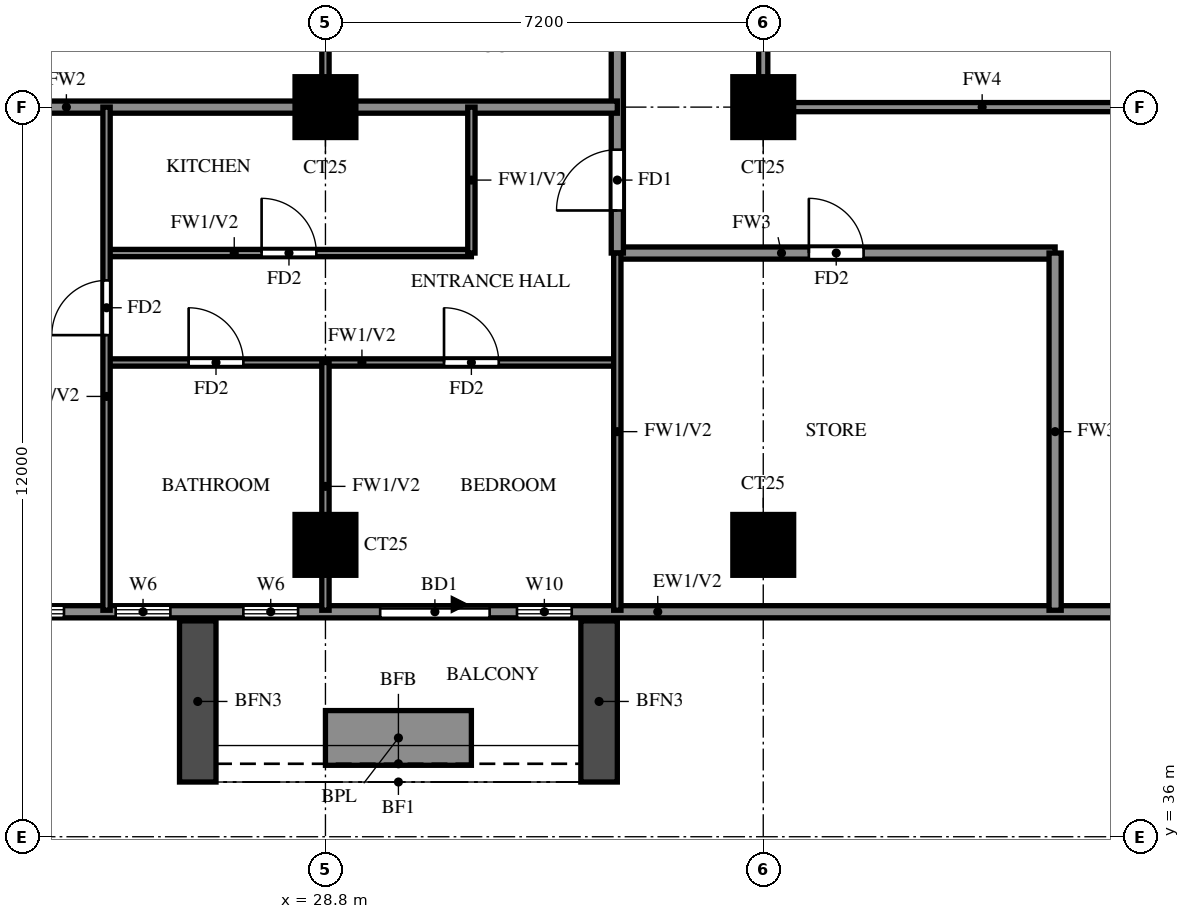
"""IFC4 building model, lengths in metres.
Left out: names, types, materials, properties, quantities, classifications, styles, units other than length and angle.
Written with IfcOpenShell. Run it as: python <this file> out.ifc"""

import sys

from ifc_helpers import new_model, si_unit, direction, frame, frame_2d, origin, origin_2d, place, context, subcontext, project, spatial, rectangle, extrude, source, transform, mapped, element, fill, save


model = new_model("IFC4")
c1 = context("Model", 3, precision=1e-05, world=origin(), true_north=direction((0.0, 1.0)))
c2 = subcontext(c1, "Body", "Model", "MODEL_VIEW")
j1 = project(units=[si_unit("LENGTHUNIT", "METRE"), si_unit("PLANEANGLEUNIT", "RADIAN")], contexts=[c1])
p1 = place(None, origin())
s1 = spatial("IfcSite", under=j1, at=p1, CompositionType="ELEMENT")
p2 = place(p1, origin())
s2 = spatial("IfcBuilding", under=s1, at=p2, CompositionType="ELEMENT")
p3 = place(p2, frame((0.0, 0.0, 146.5)))
s3 = spatial("IfcBuildingStorey", under=s2, at=p3, CompositionType="ELEMENT", Elevation=146.5)
m1 = source(origin(), c2, "Body", "SweptSolid", [
    extrude(rectangle(XDim=1.0, YDim=1.0, at=origin_2d()), origin(), (0.0, 0.0, 1.0), 3.2),
])
for number, where, z_axis, x_axis in (
    (1, (28.8, 40.8, 0.0), (0.0, 0.0, 1.0), (1.0, 0.0, 0.0)),
    (2, (36.0, 40.8, 0.0), (0.0, 0.0, 1.0), (1.0, 0.0, 0.0)),
    (3, (28.8, 48.0, 0.0), (0.0, 0.0, 1.0), (1.0, 0.0, 0.0)),
    (4, (36.0, 48.0, 0.0), (0.0, 0.0, 1.0), (1.0, 0.0, 0.0)),
):
    element("IfcColumn", number, at=place(p3, frame(where, z_axis=z_axis, x_axis=x_axis)), inside=s3, PredefinedType="COLUMN", context=c2, shape_type="MappedRepresentation", body=[
        mapped(m1, transform((0.0, 0.0, 0.0))),
    ])
p4 = place(p3, frame((18.2, 39.7, 0.0), z_axis=(0.0, 0.0, 1.0), x_axis=(1.0, 0.0, 0.0)))
e5 = element("IfcWall", 5, at=p4, inside=s3, PredefinedType="SOLIDWALL", context=c2, shape_type="SweptSolid", body=[
    extrude(rectangle(XDim=23.8, YDim=0.2, at=frame_2d((11.9, 0.0))), origin(), (0.0, 0.0, 1.0), 3.2),
])
p5 = place(p4, frame((11.5, 0.0, 0.0)))
e6 = element("IfcOpeningElement", 6, at=p5, cuts=e5, PredefinedType="OPENING", context=c2, shape_type="SweptSolid", body=[
    extrude(rectangle(XDim=1.8, YDim=2.4, at=frame_2d((0.9, 1.2))), frame((0.0, 0.11, 0.0), z_axis=(0.0, -1.0, 0.0), x_axis=(1.0, 0.0, 0.0)), (0.0, 0.0, 1.0), 0.22),
])
p6 = place(p4, frame((0.9, 0.0, 0.6)))
e7 = element("IfcOpeningElement", 7, at=p6, cuts=e5, PredefinedType="OPENING", context=c2, shape_type="SweptSolid", body=[
    extrude(rectangle(XDim=2.4, YDim=2.4, at=frame_2d((1.2, 1.2))), frame((0.0, 0.11, 0.0), z_axis=(0.0, -1.0, 0.0), x_axis=(1.0, 0.0, 0.0)), (0.0, 0.0, 1.0), 0.22),
])
p7 = place(p4, frame((3.9, 0.0, 0.6)))
e8 = element("IfcOpeningElement", 8, at=p7, cuts=e5, PredefinedType="OPENING", context=c2, shape_type="SweptSolid", body=[
    extrude(rectangle(XDim=2.4, YDim=2.4, at=frame_2d((1.2, 1.2))), frame((0.0, 0.11, 0.0), z_axis=(0.0, -1.0, 0.0), x_axis=(1.0, 0.0, 0.0)), (0.0, 0.0, 1.0), 0.22),
])
p8 = place(p4, frame((7.15, 0.0, 1.5)))
e9 = element("IfcOpeningElement", 9, at=p8, cuts=e5, PredefinedType="OPENING", context=c2, shape_type="SweptSolid", body=[
    extrude(rectangle(XDim=0.9, YDim=0.9, at=frame_2d((0.45, 0.45))), frame((0.0, 0.11, 0.0), z_axis=(0.0, -1.0, 0.0), x_axis=(1.0, 0.0, 0.0)), (0.0, 0.0, 1.0), 0.22),
])
p9 = place(p4, frame((9.25, 0.0, 1.5)))
e10 = element("IfcOpeningElement", 10, at=p9, cuts=e5, PredefinedType="OPENING", context=c2, shape_type="SweptSolid", body=[
    extrude(rectangle(XDim=0.9, YDim=0.9, at=frame_2d((0.45, 0.45))), frame((0.0, 0.11, 0.0), z_axis=(0.0, -1.0, 0.0), x_axis=(1.0, 0.0, 0.0)), (0.0, 0.0, 1.0), 0.22),
])
p10 = place(p4, frame((13.75, 0.0, 0.6)))
e11 = element("IfcOpeningElement", 11, at=p10, cuts=e5, PredefinedType="OPENING", context=c2, shape_type="SweptSolid", body=[
    extrude(rectangle(XDim=0.9, YDim=2.4, at=frame_2d((0.45, 1.2))), frame((0.0, 0.11, 0.0), z_axis=(0.0, -1.0, 0.0), x_axis=(1.0, 0.0, 0.0)), (0.0, 0.0, 1.0), 0.22),
])
for number, where, z_axis, x_axis in (
    (12, (26.7, 39.55, 0.0), (0.0, 0.0, 1.0), (0.0, -1.0, 0.0)),
    (13, (33.3, 39.55, 0.0), (0.0, 0.0, 1.0), (0.0, -1.0, 0.0)),
):
    element("IfcWall", number, at=place(p3, frame(where, z_axis=z_axis, x_axis=x_axis)), inside=s3, PredefinedType="SOLIDWALL", context=c2, shape_type="SweptSolid", body=[
        extrude(rectangle(XDim=2.65, YDim=0.6, at=frame_2d((1.325, 0.0))), origin(), (0.0, 0.0, 1.0), 2.85),
    ])
p11 = place(p3, frame((28.8, 37.625, 0.0), z_axis=(0.0, 0.0, 1.0), x_axis=(1.0, 0.0, 0.0)))
e14 = element("IfcWall", 14, at=p11, inside=s3, PredefinedType="SOLIDWALL", context=c2, shape_type="SweptSolid", body=[
    extrude(rectangle(XDim=2.4, YDim=0.9, at=frame_2d((1.2, 0.0))), origin(), (0.0, 0.0, 1.0), 0.9),
])
p12 = place(p3, frame((33.6, 45.6, 0.0), z_axis=(0.0, 0.0, 1.0), x_axis=(1.0, 0.0, 0.0)))
e15 = element("IfcWall", 15, at=p12, inside=s3, PredefinedType="SOLIDWALL", context=c2, shape_type="SweptSolid", body=[
    extrude(rectangle(XDim=7.2, YDim=0.2, at=frame_2d((3.6, 0.0))), origin(), (0.0, 0.0, 1.0), 3.2),
])
p13 = place(p12, frame((3.15, 0.0, 0.0)))
e16 = element("IfcOpeningElement", 16, at=p13, cuts=e15, PredefinedType="OPENING", context=c2, shape_type="SweptSolid", body=[
    extrude(rectangle(XDim=0.9, YDim=2.1, at=frame_2d((0.45, 1.05))), frame((0.0, 0.11, 0.0), z_axis=(0.0, -1.0, 0.0), x_axis=(1.0, 0.0, 0.0)), (0.0, 0.0, 1.0), 0.22),
])
p14 = place(p3, frame((33.6, 45.6, 0.0), z_axis=(0.0, 0.0, 1.0), x_axis=(0.0, 1.0, 0.0)))
e17 = element("IfcWall", 17, at=p14, inside=s3, PredefinedType="SOLIDWALL", context=c2, shape_type="SweptSolid", body=[
    extrude(rectangle(XDim=16.8, YDim=0.2, at=frame_2d((8.4, 0.0))), origin(), (0.0, 0.0, 1.0), 3.2),
])
p15 = place(p14, frame((0.7, 0.0, 0.0)))
e18 = element("IfcOpeningElement", 18, at=p15, cuts=e17, PredefinedType="OPENING", context=c2, shape_type="SweptSolid", body=[
    extrude(rectangle(XDim=1.0, YDim=2.1, at=frame_2d((0.5, 1.05))), frame((0.0, 0.11, 0.0), z_axis=(0.0, -1.0, 0.0), x_axis=(1.0, 0.0, 0.0)), (0.0, 0.0, 1.0), 0.22),
])
p16 = place(p14, frame((6.7, 0.0, 0.0)))
e19 = element("IfcOpeningElement", 19, at=p16, cuts=e17, PredefinedType="OPENING", context=c2, shape_type="SweptSolid", body=[
    extrude(rectangle(XDim=1.0, YDim=2.1, at=frame_2d((0.5, 1.05))), frame((0.0, 0.11, 0.0), z_axis=(0.0, -1.0, 0.0), x_axis=(1.0, 0.0, 0.0)), (0.0, 0.0, 1.0), 0.22),
])
p17 = place(p14, frame((15.1, 0.0, 0.0)))
e20 = element("IfcOpeningElement", 20, at=p17, cuts=e17, PredefinedType="OPENING", context=c2, shape_type="SweptSolid", body=[
    extrude(rectangle(XDim=1.0, YDim=2.1, at=frame_2d((0.5, 1.05))), frame((0.0, 0.11, 0.0), z_axis=(0.0, -1.0, 0.0), x_axis=(1.0, 0.0, 0.0)), (0.0, 0.0, 1.0), 0.22),
])
p18 = place(p3, frame((40.8, 39.725, 0.0), z_axis=(0.0, 0.0, 1.0), x_axis=(0.0, 1.0, 0.0)))
e21 = element("IfcWall", 21, at=p18, inside=s3, PredefinedType="SOLIDWALL", context=c2, shape_type="SweptSolid", body=[
    extrude(rectangle(XDim=5.875, YDim=0.2, at=frame_2d((2.938, 0.0))), origin(), (0.0, 0.0, 1.0), 3.2),
])
p19 = place(p3, frame((14.525, 48.0, 0.0), z_axis=(0.0, 0.0, 1.0), x_axis=(1.0, 0.0, 0.0)))
e22 = element("IfcWall", 22, at=p19, inside=s3, PredefinedType="SOLIDWALL", context=c2, shape_type="SweptSolid", body=[
    extrude(rectangle(XDim=19.075, YDim=0.2, at=frame_2d((9.538, 0.0))), origin(), (0.0, 0.0, 1.0), 3.2),
])
p20 = place(p3, frame((25.2, 43.8, 0.0), z_axis=(0.0, 0.0, 1.0), x_axis=(1.0, 0.0, 0.0)))
e23 = element("IfcWall", 23, at=p20, inside=s3, PredefinedType="PARTITIONING", context=c2, shape_type="SweptSolid", body=[
    extrude(rectangle(XDim=8.4, YDim=0.12, at=frame_2d((4.2, 0.0))), origin(), (0.0, 0.0, 1.0), 3.2),
])
p21 = place(p20, frame((1.35, 0.0, 0.0)))
e24 = element("IfcOpeningElement", 24, at=p21, cuts=e23, PredefinedType="OPENING", context=c2, shape_type="SweptSolid", body=[
    extrude(rectangle(XDim=0.9, YDim=2.1, at=frame_2d((0.45, 1.05))), frame((0.0, 0.07, 0.0), z_axis=(0.0, -1.0, 0.0), x_axis=(1.0, 0.0, 0.0)), (0.0, 0.0, 1.0), 0.14),
])
p22 = place(p20, frame((5.55, 0.0, 0.0)))
e25 = element("IfcOpeningElement", 25, at=p22, cuts=e23, PredefinedType="OPENING", context=c2, shape_type="SweptSolid", body=[
    extrude(rectangle(XDim=0.9, YDim=2.1, at=frame_2d((0.45, 1.05))), frame((0.0, 0.07, 0.0), z_axis=(0.0, -1.0, 0.0), x_axis=(1.0, 0.0, 0.0)), (0.0, 0.0, 1.0), 0.14),
])
p23 = place(p3, frame((25.2, 45.6, 0.0), z_axis=(0.0, 0.0, 1.0), x_axis=(1.0, 0.0, 0.0)))
e26 = element("IfcWall", 26, at=p23, inside=s3, PredefinedType="PARTITIONING", context=c2, shape_type="SweptSolid", body=[
    extrude(rectangle(XDim=6.0, YDim=0.12, at=frame_2d((3.0, 0.0))), origin(), (0.0, 0.0, 1.0), 3.2),
])
p24 = place(p23, frame((2.55, 0.0, 0.0)))
e27 = element("IfcOpeningElement", 27, at=p24, cuts=e26, PredefinedType="OPENING", context=c2, shape_type="SweptSolid", body=[
    extrude(rectangle(XDim=0.9, YDim=2.1, at=frame_2d((0.45, 1.05))), frame((0.0, 0.07, 0.0), z_axis=(0.0, -1.0, 0.0), x_axis=(1.0, 0.0, 0.0)), (0.0, 0.0, 1.0), 0.14),
])
p25 = place(p3, frame((25.2, 39.725, 0.0), z_axis=(0.0, 0.0, 1.0), x_axis=(0.0, 1.0, 0.0)))
e28 = element("IfcWall", 28, at=p25, inside=s3, PredefinedType="PARTITIONING", context=c2, shape_type="SweptSolid", body=[
    extrude(rectangle(XDim=8.275, YDim=0.12, at=frame_2d((4.137, 0.0))), origin(), (0.0, 0.0, 1.0), 3.2),
])
p26 = place(p25, frame((4.525, 0.0, 0.0)))
e29 = element("IfcOpeningElement", 29, at=p26, cuts=e28, PredefinedType="OPENING", context=c2, shape_type="SweptSolid", body=[
    extrude(rectangle(XDim=0.9, YDim=2.1, at=frame_2d((0.45, 1.05))), frame((0.0, 0.07, 0.0), z_axis=(0.0, -1.0, 0.0), x_axis=(1.0, 0.0, 0.0)), (0.0, 0.0, 1.0), 0.14),
])
p27 = place(p3, frame((28.8, 39.725, 0.0), z_axis=(0.0, 0.0, 1.0), x_axis=(0.0, 1.0, 0.0)))
e30 = element("IfcWall", 30, at=p27, inside=s3, PredefinedType="PARTITIONING", context=c2, shape_type="SweptSolid", body=[
    extrude(rectangle(XDim=4.075, YDim=0.12, at=frame_2d((2.038, 0.0))), origin(), (0.0, 0.0, 1.0), 3.2),
])
p28 = place(p3, frame((28.8, 48.0, 0.0), z_axis=(0.0, 0.0, 1.0), x_axis=(0.0, 1.0, 0.0)))
e31 = element("IfcWall", 31, at=p28, inside=s3, PredefinedType="PARTITIONING", context=c2, shape_type="SweptSolid", body=[
    extrude(rectangle(XDim=3.6, YDim=0.12, at=frame_2d((1.8, 0.0))), origin(), (0.0, 0.0, 1.0), 3.2),
])
p29 = place(p3, frame((31.2, 45.6, 0.0), z_axis=(0.0, 0.0, 1.0), x_axis=(0.0, 1.0, 0.0)))
e32 = element("IfcWall", 32, at=p29, inside=s3, PredefinedType="PARTITIONING", context=c2, shape_type="SweptSolid", body=[
    extrude(rectangle(XDim=2.4, YDim=0.12, at=frame_2d((1.2, 0.0))), origin(), (0.0, 0.0, 1.0), 3.2),
])
p30 = place(p3, frame((33.6, 39.725, 0.0), z_axis=(0.0, 0.0, 1.0), x_axis=(0.0, 1.0, 0.0)))
e33 = element("IfcWall", 33, at=p30, inside=s3, PredefinedType="PARTITIONING", context=c2, shape_type="SweptSolid", body=[
    extrude(rectangle(XDim=5.875, YDim=0.12, at=frame_2d((2.938, 0.0))), origin(), (0.0, 0.0, 1.0), 3.2),
])
p31 = place(p3, frame((36.0, 48.0, 0.0), z_axis=(0.0, 0.0, 1.0), x_axis=(1.0, 0.0, 0.0)))
e34 = element("IfcWall", 34, at=p31, inside=s3, PredefinedType="SOLIDWALL", context=c2, shape_type="SweptSolid", body=[
    extrude(rectangle(XDim=7.2, YDim=0.15, at=frame_2d((3.6, 0.0))), origin(), (0.0, 0.0, 1.0), 2.3),
])
p32 = place(p3, frame((36.0, 48.0, 0.0), z_axis=(0.0, 0.0, 1.0), x_axis=(0.0, 1.0, 0.0)))
e35 = element("IfcWall", 35, at=p32, inside=s3, PredefinedType="SOLIDWALL", context=c2, shape_type="SweptSolid", body=[
    extrude(rectangle(XDim=14.4, YDim=0.15, at=frame_2d((7.2, 0.0))), origin(), (0.0, 0.0, 1.0), 2.3),
])
p33 = place(p5, origin())
e36 = element("IfcDoor", 36, at=p33, inside=s3, OperationType="DOUBLE_DOOR_SLIDING", PredefinedType="DOOR", context=c2, shape_type="SweptSolid", body=[
    extrude(rectangle(XDim=1.8, YDim=2.4, at=frame_2d((0.9, 1.2))), frame((0.0, 0.025, 0.0), z_axis=(0.0, -1.0, 0.0), x_axis=(1.0, 0.0, 0.0)), (0.0, 0.0, 1.0), 0.05),
])
fill(e6, e36)
p34 = place(p7, origin())
e37 = element("IfcWindow", 37, at=p34, inside=s3, PartitioningType="DOUBLE_PANEL_VERTICAL", PredefinedType="WINDOW", context=c2, shape_type="SweptSolid", body=[
    extrude(rectangle(XDim=2.4, YDim=2.4, at=frame_2d((1.2, 1.2))), frame((0.0, 0.03, 0.0), z_axis=(0.0, -1.0, 0.0), x_axis=(1.0, 0.0, 0.0)), (0.0, 0.0, 1.0), 0.06),
])
fill(e8, e37)
p35 = place(p8, origin())
e38 = element("IfcWindow", 38, at=p35, inside=s3, PartitioningType="SINGLE_PANEL", PredefinedType="WINDOW", context=c2, shape_type="SweptSolid", body=[
    extrude(rectangle(XDim=0.9, YDim=0.9, at=frame_2d((0.45, 0.45))), frame((0.0, 0.03, 0.0), z_axis=(0.0, -1.0, 0.0), x_axis=(1.0, 0.0, 0.0)), (0.0, 0.0, 1.0), 0.06),
])
fill(e9, e38)
p36 = place(p9, origin())
e39 = element("IfcWindow", 39, at=p36, inside=s3, PartitioningType="SINGLE_PANEL", PredefinedType="WINDOW", context=c2, shape_type="SweptSolid", body=[
    extrude(rectangle(XDim=0.9, YDim=0.9, at=frame_2d((0.45, 0.45))), frame((0.0, 0.03, 0.0), z_axis=(0.0, -1.0, 0.0), x_axis=(1.0, 0.0, 0.0)), (0.0, 0.0, 1.0), 0.06),
])
fill(e10, e39)
p37 = place(p10, origin())
e40 = element("IfcWindow", 40, at=p37, inside=s3, PartitioningType="SINGLE_PANEL", PredefinedType="WINDOW", context=c2, shape_type="SweptSolid", body=[
    extrude(rectangle(XDim=0.9, YDim=2.4, at=frame_2d((0.45, 1.2))), frame((0.0, 0.03, 0.0), z_axis=(0.0, -1.0, 0.0), x_axis=(1.0, 0.0, 0.0)), (0.0, 0.0, 1.0), 0.06),
])
fill(e11, e40)
p38 = place(p15, origin())
e41 = element("IfcDoor", 41, at=p38, inside=s3, OperationType="SINGLE_SWING_LEFT", PredefinedType="DOOR", context=c2, shape_type="SweptSolid", body=[
    extrude(rectangle(XDim=1.0, YDim=2.1, at=frame_2d((0.5, 1.05))), frame((0.0, 0.025, 0.0), z_axis=(0.0, -1.0, 0.0), x_axis=(1.0, 0.0, 0.0)), (0.0, 0.0, 1.0), 0.05),
])
fill(e18, e41)
p39 = place(p26, origin())
e42 = element("IfcDoor", 42, at=p39, inside=s3, OperationType="SINGLE_SWING_RIGHT", PredefinedType="DOOR", context=c2, shape_type="SweptSolid", body=[
    extrude(rectangle(XDim=0.9, YDim=2.1, at=frame_2d((0.45, 1.05))), frame((0.0, 0.025, 0.0), z_axis=(0.0, -1.0, 0.0), x_axis=(1.0, 0.0, 0.0)), (0.0, 0.0, 1.0), 0.05),
])
fill(e29, e42)
p40 = place(p21, origin())
e43 = element("IfcDoor", 43, at=p40, inside=s3, OperationType="SINGLE_SWING_LEFT", PredefinedType="DOOR", context=c2, shape_type="SweptSolid", body=[
    extrude(rectangle(XDim=0.9, YDim=2.1, at=frame_2d((0.45, 1.05))), frame((0.0, 0.025, 0.0), z_axis=(0.0, -1.0, 0.0), x_axis=(1.0, 0.0, 0.0)), (0.0, 0.0, 1.0), 0.05),
])
fill(e24, e43)
p41 = place(p22, origin())
e44 = element("IfcDoor", 44, at=p41, inside=s3, OperationType="SINGLE_SWING_LEFT", PredefinedType="DOOR", context=c2, shape_type="SweptSolid", body=[
    extrude(rectangle(XDim=0.9, YDim=2.1, at=frame_2d((0.45, 1.05))), frame((0.0, 0.025, 0.0), z_axis=(0.0, -1.0, 0.0), x_axis=(1.0, 0.0, 0.0)), (0.0, 0.0, 1.0), 0.05),
])
fill(e25, e44)
p42 = place(p24, origin())
e45 = element("IfcDoor", 45, at=p42, inside=s3, OperationType="SINGLE_SWING_RIGHT", PredefinedType="DOOR", context=c2, shape_type="SweptSolid", body=[
    extrude(rectangle(XDim=0.9, YDim=2.1, at=frame_2d((0.45, 1.05))), frame((0.0, 0.025, 0.0), z_axis=(0.0, -1.0, 0.0), x_axis=(1.0, 0.0, 0.0)), (0.0, 0.0, 1.0), 0.05),
])
fill(e27, e45)
p43 = place(p13, origin())
e46 = element("IfcDoor", 46, at=p43, inside=s3, OperationType="SINGLE_SWING_LEFT", PredefinedType="DOOR", context=c2, shape_type="SweptSolid", body=[
    extrude(rectangle(XDim=0.9, YDim=2.1, at=frame_2d((0.45, 1.05))), frame((0.0, 0.025, 0.0), z_axis=(0.0, -1.0, 0.0), x_axis=(1.0, 0.0, 0.0)), (0.0, 0.0, 1.0), 0.05),
])
fill(e16, e46)
save(model, sys.argv[1])
